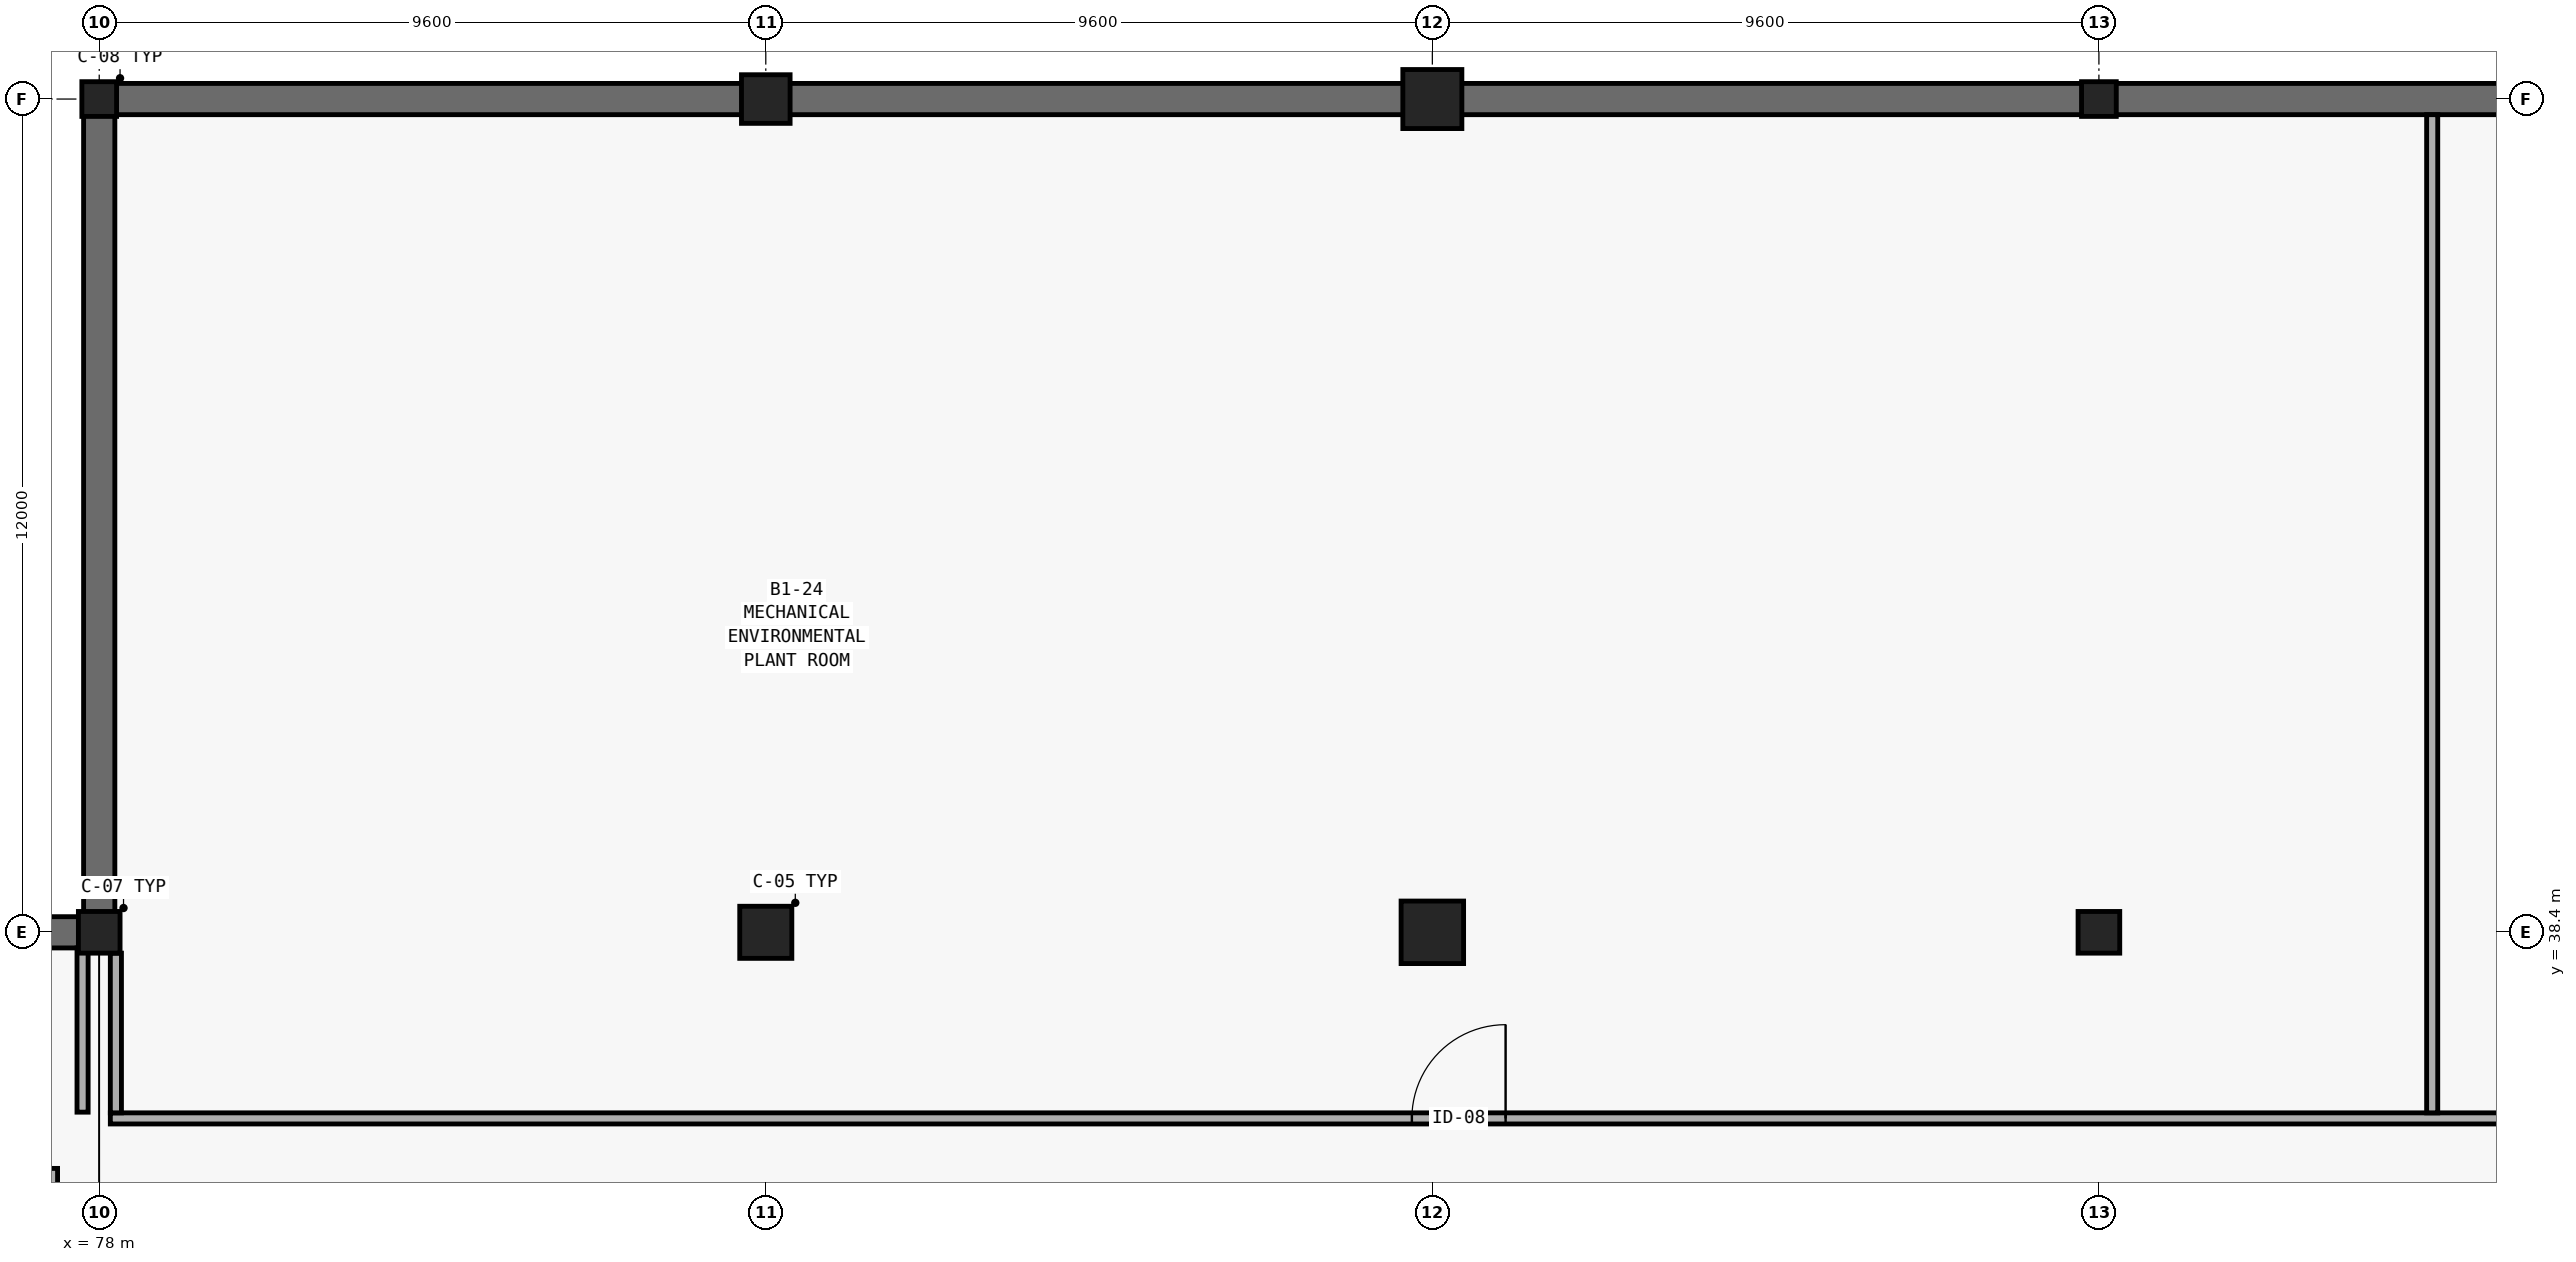
"""IFC4 building model, lengths in metres.
Left out: names, types, materials, properties, quantities, classifications, styles, units other than length and angle.
Written with IfcOpenShell. Run it as: python <this file> out.ifc"""

import sys

from ifc_helpers import new_model, si_unit, direction, frame, frame_2d, origin, origin_2d, place, context, subcontext, project, spatial, rectangle, extrude, element, fill, save


model = new_model("IFC4")
c1 = context("Model", 3, precision=1e-05, world=origin(), true_north=direction((0.0, 1.0)))
c2 = subcontext(c1, "Body", "Model", "MODEL_VIEW")
j1 = project(units=[si_unit("LENGTHUNIT", "METRE"), si_unit("PLANEANGLEUNIT", "RADIAN")], contexts=[c1])
p1 = place(None, origin())
s1 = spatial("IfcSite", under=j1, at=p1, CompositionType="ELEMENT")
p2 = place(p1, origin())
s2 = spatial("IfcBuilding", under=s1, at=p2, CompositionType="ELEMENT")
p3 = place(p2, frame((0.0, 0.0, -4.8)))
s3 = spatial("IfcBuildingStorey", under=s2, at=p3, CompositionType="ELEMENT", Elevation=-4.8)
p4 = place(p3, frame((78.0, 38.4, 0.0), z_axis=(0.0, 0.0, 1.0), x_axis=(1.0, 0.0, 0.0)))
e1 = element("IfcColumn", 1, at=p4, inside=s3, PredefinedType="COLUMN", context=c2, shape_type="SweptSolid", body=[
    extrude(rectangle(XDim=0.6, YDim=0.6, at=origin_2d()), origin(), (0.0, 0.0, 1.0), 4.8),
])
p5 = place(p3, frame((78.0, 50.4, 0.0), z_axis=(0.0, 0.0, 1.0), x_axis=(1.0, 0.0, 0.0)))
e2 = element("IfcColumn", 2, at=p5, inside=s3, PredefinedType="COLUMN", context=c2, shape_type="SweptSolid", body=[
    extrude(rectangle(XDim=0.5, YDim=0.5, at=origin_2d()), origin(), (0.0, 0.0, 1.0), 4.8),
])
p6 = place(p3, frame((87.6, 38.4, 0.0), z_axis=(0.0, 0.0, 1.0), x_axis=(1.0, 0.0, 0.0)))
e3 = element("IfcColumn", 3, at=p6, inside=s3, PredefinedType="COLUMN", context=c2, shape_type="SweptSolid", body=[
    extrude(rectangle(XDim=0.75, YDim=0.75, at=origin_2d()), origin(), (0.0, 0.0, 1.0), 4.8),
])
p7 = place(p3, frame((87.6, 50.4, 0.0), z_axis=(0.0, 0.0, 1.0), x_axis=(1.0, 0.0, 0.0)))
e4 = element("IfcColumn", 4, at=p7, inside=s3, PredefinedType="COLUMN", context=c2, shape_type="SweptSolid", body=[
    extrude(rectangle(XDim=0.7, YDim=0.7, at=origin_2d()), origin(), (0.0, 0.0, 1.0), 4.8),
])
p8 = place(p3, frame((97.2, 38.4, 0.0), z_axis=(0.0, 0.0, 1.0), x_axis=(1.0, 0.0, 0.0)))
e5 = element("IfcColumn", 5, at=p8, inside=s3, PredefinedType="COLUMN", context=c2, shape_type="SweptSolid", body=[
    extrude(rectangle(XDim=0.9, YDim=0.9, at=origin_2d()), origin(), (0.0, 0.0, 1.0), 4.8),
])
p9 = place(p3, frame((97.2, 50.4, 0.0), z_axis=(0.0, 0.0, 1.0), x_axis=(1.0, 0.0, 0.0)))
e6 = element("IfcColumn", 6, at=p9, inside=s3, PredefinedType="COLUMN", context=c2, shape_type="SweptSolid", body=[
    extrude(rectangle(XDim=0.85, YDim=0.85, at=origin_2d()), origin(), (0.0, 0.0, 1.0), 4.8),
])
p10 = place(p3, frame((106.8, 38.4, 0.0), z_axis=(0.0, 0.0, 1.0), x_axis=(1.0, 0.0, 0.0)))
e7 = element("IfcColumn", 7, at=p10, inside=s3, PredefinedType="COLUMN", context=c2, shape_type="SweptSolid", body=[
    extrude(rectangle(XDim=0.6, YDim=0.6, at=origin_2d()), origin(), (0.0, 0.0, 1.0), 4.8),
])
p11 = place(p3, frame((106.8, 50.4, 0.0), z_axis=(0.0, 0.0, 1.0), x_axis=(1.0, 0.0, 0.0)))
e8 = element("IfcColumn", 8, at=p11, inside=s3, PredefinedType="COLUMN", context=c2, shape_type="SweptSolid", body=[
    extrude(rectangle(XDim=0.5, YDim=0.5, at=origin_2d()), origin(), (0.0, 0.0, 1.0), 4.8),
])
p12 = place(p3, frame((116.4, 50.4, 0.0), z_axis=(0.0, 0.0, 1.0), x_axis=(-1.0, 0.0, 0.0)))
e9 = element("IfcWall", 9, at=p12, inside=s3, PredefinedType="SHEAR", context=c2, shape_type="SweptSolid", body=[
    extrude(rectangle(XDim=9.6, YDim=0.45, at=frame_2d((4.8, 0.0))), origin(), (0.0, 0.0, 1.0), 4.8),
])
p13 = place(p3, frame((106.8, 50.4, 0.0), z_axis=(0.0, 0.0, 1.0), x_axis=(-1.0, 0.0, 0.0)))
e10 = element("IfcWall", 10, at=p13, inside=s3, PredefinedType="SHEAR", context=c2, shape_type="SweptSolid", body=[
    extrude(rectangle(XDim=9.6, YDim=0.45, at=frame_2d((4.8, 0.0))), origin(), (0.0, 0.0, 1.0), 4.8),
])
p14 = place(p3, frame((97.2, 50.4, 0.0), z_axis=(0.0, 0.0, 1.0), x_axis=(-1.0, 0.0, 0.0)))
e11 = element("IfcWall", 11, at=p14, inside=s3, PredefinedType="SHEAR", context=c2, shape_type="SweptSolid", body=[
    extrude(rectangle(XDim=9.6, YDim=0.45, at=frame_2d((4.8, 0.0))), origin(), (0.0, 0.0, 1.0), 4.8),
])
p15 = place(p3, frame((87.6, 50.4, 0.0), z_axis=(0.0, 0.0, 1.0), x_axis=(-1.0, 0.0, 0.0)))
e12 = element("IfcWall", 12, at=p15, inside=s3, PredefinedType="SHEAR", context=c2, shape_type="SweptSolid", body=[
    extrude(rectangle(XDim=9.6, YDim=0.45, at=frame_2d((4.8, 0.0))), origin(), (0.0, 0.0, 1.0), 4.8),
])
p16 = place(p3, frame((78.0, 50.4, 0.0), z_axis=(0.0, 0.0, 1.0), x_axis=(0.0, -1.0, 0.0)))
e13 = element("IfcWall", 13, at=p16, inside=s3, PredefinedType="SHEAR", context=c2, shape_type="SweptSolid", body=[
    extrude(rectangle(XDim=12.0, YDim=0.45, at=frame_2d((6.0, 0.0))), origin(), (0.0, 0.0, 1.0), 4.8),
])
p17 = place(p3, frame((78.0, 38.4, 0.0), z_axis=(0.0, 0.0, 1.0), x_axis=(-1.0, 0.0, 0.0)))
e14 = element("IfcWall", 14, at=p17, inside=s3, PredefinedType="SHEAR", context=c2, shape_type="SweptSolid", body=[
    extrude(rectangle(XDim=10.0, YDim=0.45, at=frame_2d((5.0, 0.0))), origin(), (0.0, 0.0, 1.0), 4.8),
])
p18 = place(p3, frame((78.16, 35.72, 0.0), z_axis=(0.0, 0.0, 1.0), x_axis=(1.0, 0.0, 0.0)))
e15 = element("IfcWall", 15, at=p18, inside=s3, PredefinedType="PARTITIONING", context=c2, shape_type="SweptSolid", body=[
    extrude(rectangle(XDim=38.84, YDim=0.16, at=frame_2d((19.42, 0.0))), origin(), (0.0, 0.0, 1.0), 3.26),
])
p19 = place(p18, frame((18.745, 0.0, 0.0)))
e16 = element("IfcOpeningElement", 16, at=p19, cuts=e15, PredefinedType="OPENING", context=c2, shape_type="SweptSolid", body=[
    extrude(rectangle(XDim=1.35, YDim=2.2, at=frame_2d((0.675, 1.1))), frame((0.0, 0.095, 0.0), z_axis=(0.0, -1.0, 0.0), x_axis=(1.0, 0.0, 0.0)), (0.0, 0.0, 1.0), 0.19),
])
p20 = place(p18, frame((35.058, 0.0, 0.0)))
e17 = element("IfcOpeningElement", 17, at=p20, cuts=e15, PredefinedType="OPENING", context=c2, shape_type="SweptSolid", body=[
    extrude(rectangle(XDim=1.35, YDim=2.2, at=frame_2d((0.675, 1.1))), frame((0.0, 0.095, 0.0), z_axis=(0.0, -1.0, 0.0), x_axis=(1.0, 0.0, 0.0)), (0.0, 0.0, 1.0), 0.19),
])
p21 = place(p3, frame((77.32, 32.56, 0.0), z_axis=(0.0, 0.0, 1.0), x_axis=(0.0, 1.0, 0.0)))
e18 = element("IfcWall", 18, at=p21, inside=s3, PredefinedType="PARTITIONING", context=c2, shape_type="SweptSolid", body=[
    extrude(rectangle(XDim=2.44, YDim=0.16, at=frame_2d((1.22, 0.0))), origin(), (0.0, 0.0, 1.0), 3.26),
])
p22 = place(p3, frame((77.76, 35.81, 0.0), z_axis=(0.0, 0.0, 1.0), x_axis=(0.0, 1.0, 0.0)))
e19 = element("IfcWall", 19, at=p22, inside=s3, PredefinedType="PARTITIONING", context=c2, shape_type="SweptSolid", body=[
    extrude(rectangle(XDim=2.365, YDim=0.16, at=frame_2d((1.183, 0.0))), origin(), (0.0, 0.0, 1.0), 3.26),
])
p23 = place(p3, frame((78.24, 35.8, 0.0), z_axis=(0.0, 0.0, 1.0), x_axis=(0.0, 1.0, 0.0)))
e20 = element("IfcWall", 20, at=p23, inside=s3, PredefinedType="PARTITIONING", context=c2, shape_type="SweptSolid", body=[
    extrude(rectangle(XDim=2.3, YDim=0.16, at=frame_2d((1.15, 0.0))), origin(), (0.0, 0.0, 1.0), 3.26),
])
p24 = place(p3, frame((111.6, 35.8, 0.0), z_axis=(0.0, 0.0, 1.0), x_axis=(0.0, 1.0, 0.0)))
e21 = element("IfcWall", 21, at=p24, inside=s3, PredefinedType="PARTITIONING", context=c2, shape_type="SweptSolid", body=[
    extrude(rectangle(XDim=14.375, YDim=0.16, at=frame_2d((7.188, 0.0))), origin(), (0.0, 0.0, 1.0), 3.26),
])
p25 = place(p19, origin())
e22 = element("IfcDoor", 22, at=p25, inside=s3, OperationType="SINGLE_SWING_RIGHT", PredefinedType="DOOR", context=c2, shape_type="SweptSolid", body=[
    extrude(rectangle(XDim=1.35, YDim=2.2, at=frame_2d((0.675, 1.1))), frame((0.0, 0.025, 0.0), z_axis=(0.0, -1.0, 0.0), x_axis=(1.0, 0.0, 0.0)), (0.0, 0.0, 1.0), 0.05),
])
fill(e16, e22)
save(model, sys.argv[1])
